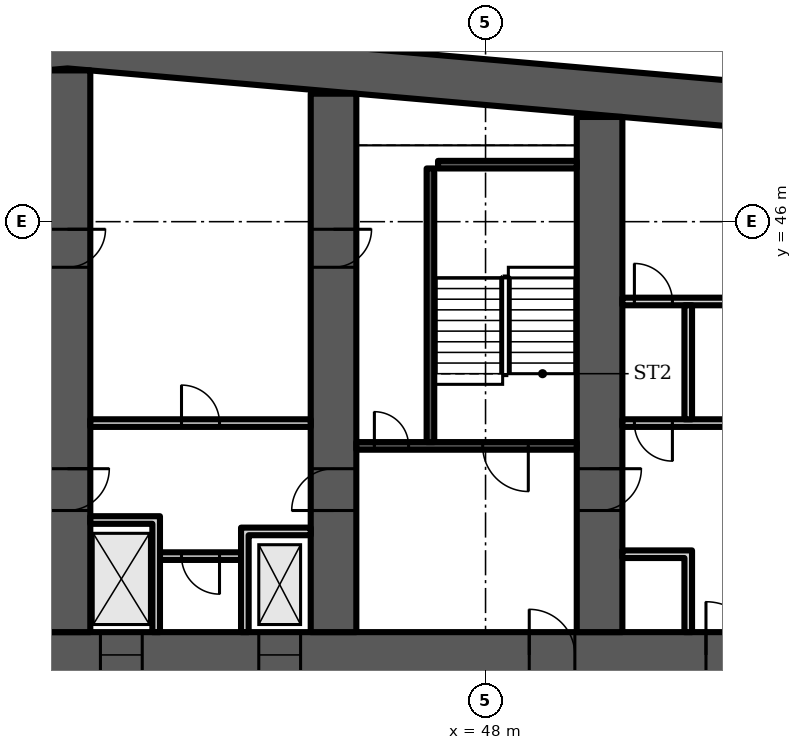
"""IFC4 building model, lengths in metres.
Left out: names, types, materials, properties, quantities, classifications, styles, units other than length and angle.
Written with IfcOpenShell. Run it as: python <this file> out.ifc"""

import sys

from ifc_helpers import new_model, si_unit, direction, frame, frame_2d, origin, place, context, subcontext, project, spatial, polyline, rectangle, outline, extrude, element, fill, save


model = new_model("IFC4")
c1 = context("Model", 3, precision=1e-05, world=origin(), true_north=direction((0.0, 1.0)))
c2 = subcontext(c1, "Body", "Model", "MODEL_VIEW")
j1 = project(units=[si_unit("LENGTHUNIT", "METRE"), si_unit("PLANEANGLEUNIT", "RADIAN")], contexts=[c1])
p1 = place(None, origin())
s1 = spatial("IfcSite", under=j1, at=p1, CompositionType="ELEMENT")
p2 = place(p1, origin())
s2 = spatial("IfcBuilding", under=s1, at=p2, CompositionType="ELEMENT")
p3 = place(p2, frame((0.0, 0.0, 55.9)))
s3 = spatial("IfcBuildingStorey", under=s2, at=p3, CompositionType="ELEMENT", Elevation=55.9)
p4 = place(p3, origin())
e1 = element("IfcWall", 1, at=p4, inside=s3, PredefinedType="SHEAR", context=c2, shape_type="SweptSolid", body=[
    extrude(outline(polyline([(9.0, 47.583), (37.0, 50.032), (65.0, 47.583), (65.0, 48.787), (37.0, 51.237), (9.0, 48.787), (9.0, 47.583)])), origin(), (0.0, 0.0, 1.0), 3.6),
])
p5 = place(p3, frame((9.0, 34.6, 0.0), z_axis=(0.0, 0.0, 1.0), x_axis=(1.0, 0.0, 0.0)))
e2 = element("IfcWall", 2, at=p5, inside=s3, PredefinedType="SHEAR", context=c2, shape_type="SweptSolid", body=[
    extrude(rectangle(XDim=56.0, YDim=1.2, at=frame_2d((28.0, 0.0))), origin(), (0.0, 0.0, 1.0), 3.6),
])
p6 = place(p5, frame((3.3, 0.0, 0.0)))
e3 = element("IfcOpeningElement", 3, at=p6, cuts=e2, PredefinedType="OPENING", context=c2, shape_type="SweptSolid", body=[
    extrude(rectangle(XDim=1.0, YDim=2.1, at=frame_2d((0.5, 1.05))), frame((0.0, 0.61, 0.0), z_axis=(0.0, -1.0, 0.0), x_axis=(1.0, 0.0, 0.0)), (0.0, 0.0, 1.0), 1.22),
])
p7 = place(p5, frame((7.867, 0.0, 0.0)))
e4 = element("IfcOpeningElement", 4, at=p7, cuts=e2, PredefinedType="OPENING", context=c2, shape_type="SweptSolid", body=[
    extrude(rectangle(XDim=1.1, YDim=2.1, at=frame_2d((0.55, 1.05))), frame((0.0, 0.61, 0.0), z_axis=(0.0, -1.0, 0.0), x_axis=(1.0, 0.0, 0.0)), (0.0, 0.0, 1.0), 1.22),
])
p8 = place(p5, frame((12.033, 0.0, 0.0)))
e5 = element("IfcOpeningElement", 5, at=p8, cuts=e2, PredefinedType="OPENING", context=c2, shape_type="SweptSolid", body=[
    extrude(rectangle(XDim=1.1, YDim=2.1, at=frame_2d((0.55, 1.05))), frame((0.0, 0.61, 0.0), z_axis=(0.0, -1.0, 0.0), x_axis=(1.0, 0.0, 0.0)), (0.0, 0.0, 1.0), 1.22),
])
p9 = place(p5, frame((9.8, 0.0, 0.0)))
e6 = element("IfcOpeningElement", 6, at=p9, cuts=e2, PredefinedType="OPENING", context=c2, shape_type="SweptSolid", body=[
    extrude(rectangle(XDim=1.4, YDim=2.1, at=frame_2d((0.7, 1.05))), frame((0.0, 0.61, 0.0), z_axis=(0.0, -1.0, 0.0), x_axis=(1.0, 0.0, 0.0)), (0.0, 0.0, 1.0), 1.22),
])
p10 = place(p5, frame((14.65, 0.0, 0.0)))
e7 = element("IfcOpeningElement", 7, at=p10, cuts=e2, PredefinedType="OPENING", context=c2, shape_type="SweptSolid", body=[
    extrude(rectangle(XDim=1.2, YDim=2.1, at=frame_2d((0.6, 1.05))), frame((0.0, 0.61, 0.0), z_axis=(0.0, -1.0, 0.0), x_axis=(1.0, 0.0, 0.0)), (0.0, 0.0, 1.0), 1.22),
])
p11 = place(p5, frame((21.867, 0.0, 0.0)))
e8 = element("IfcOpeningElement", 8, at=p11, cuts=e2, PredefinedType="OPENING", context=c2, shape_type="SweptSolid", body=[
    extrude(rectangle(XDim=1.1, YDim=2.1, at=frame_2d((0.55, 1.05))), frame((0.0, 0.61, 0.0), z_axis=(0.0, -1.0, 0.0), x_axis=(1.0, 0.0, 0.0)), (0.0, 0.0, 1.0), 1.22),
])
p12 = place(p5, frame((26.033, 0.0, 0.0)))
e9 = element("IfcOpeningElement", 9, at=p12, cuts=e2, PredefinedType="OPENING", context=c2, shape_type="SweptSolid", body=[
    extrude(rectangle(XDim=1.1, YDim=2.1, at=frame_2d((0.55, 1.05))), frame((0.0, 0.61, 0.0), z_axis=(0.0, -1.0, 0.0), x_axis=(1.0, 0.0, 0.0)), (0.0, 0.0, 1.0), 1.22),
])
p13 = place(p5, frame((23.8, 0.0, 0.0)))
e10 = element("IfcOpeningElement", 10, at=p13, cuts=e2, PredefinedType="OPENING", context=c2, shape_type="SweptSolid", body=[
    extrude(rectangle(XDim=1.4, YDim=2.1, at=frame_2d((0.7, 1.05))), frame((0.0, 0.61, 0.0), z_axis=(0.0, -1.0, 0.0), x_axis=(1.0, 0.0, 0.0)), (0.0, 0.0, 1.0), 1.22),
])
p14 = place(p5, frame((28.867, 0.0, 0.0)))
e11 = element("IfcOpeningElement", 11, at=p14, cuts=e2, PredefinedType="OPENING", context=c2, shape_type="SweptSolid", body=[
    extrude(rectangle(XDim=1.1, YDim=2.1, at=frame_2d((0.55, 1.05))), frame((0.0, 0.61, 0.0), z_axis=(0.0, -1.0, 0.0), x_axis=(1.0, 0.0, 0.0)), (0.0, 0.0, 1.0), 1.22),
])
p15 = place(p5, frame((33.033, 0.0, 0.0)))
e12 = element("IfcOpeningElement", 12, at=p15, cuts=e2, PredefinedType="OPENING", context=c2, shape_type="SweptSolid", body=[
    extrude(rectangle(XDim=1.1, YDim=2.1, at=frame_2d((0.55, 1.05))), frame((0.0, 0.61, 0.0), z_axis=(0.0, -1.0, 0.0), x_axis=(1.0, 0.0, 0.0)), (0.0, 0.0, 1.0), 1.22),
])
p16 = place(p5, frame((40.15, 0.0, 0.0)))
e13 = element("IfcOpeningElement", 13, at=p16, cuts=e2, PredefinedType="OPENING", context=c2, shape_type="SweptSolid", body=[
    extrude(rectangle(XDim=1.2, YDim=2.1, at=frame_2d((0.6, 1.05))), frame((0.0, 0.61, 0.0), z_axis=(0.0, -1.0, 0.0), x_axis=(1.0, 0.0, 0.0)), (0.0, 0.0, 1.0), 1.22),
])
p17 = place(p5, frame((44.8, 0.0, 0.0)))
e14 = element("IfcOpeningElement", 14, at=p17, cuts=e2, PredefinedType="OPENING", context=c2, shape_type="SweptSolid", body=[
    extrude(rectangle(XDim=1.4, YDim=2.1, at=frame_2d((0.7, 1.05))), frame((0.0, 0.61, 0.0), z_axis=(0.0, -1.0, 0.0), x_axis=(1.0, 0.0, 0.0)), (0.0, 0.0, 1.0), 1.22),
])
p18 = place(p5, frame((49.867, 0.0, 0.0)))
e15 = element("IfcOpeningElement", 15, at=p18, cuts=e2, PredefinedType="OPENING", context=c2, shape_type="SweptSolid", body=[
    extrude(rectangle(XDim=1.1, YDim=2.1, at=frame_2d((0.55, 1.05))), frame((0.0, 0.61, 0.0), z_axis=(0.0, -1.0, 0.0), x_axis=(1.0, 0.0, 0.0)), (0.0, 0.0, 1.0), 1.22),
])
p19 = place(p5, frame((53.5, 0.0, 0.0)))
e16 = element("IfcOpeningElement", 16, at=p19, cuts=e2, PredefinedType="OPENING", context=c2, shape_type="SweptSolid", body=[
    extrude(rectangle(XDim=1.1, YDim=2.1, at=frame_2d((0.55, 1.05))), frame((0.0, 0.61, 0.0), z_axis=(0.0, -1.0, 0.0), x_axis=(1.0, 0.0, 0.0)), (0.0, 0.0, 1.0), 1.22),
])
p20 = place(p5, frame((51.567, 0.0, 0.0)))
e17 = element("IfcOpeningElement", 17, at=p20, cuts=e2, PredefinedType="OPENING", context=c2, shape_type="SweptSolid", body=[
    extrude(rectangle(XDim=1.4, YDim=2.1, at=frame_2d((0.7, 1.05))), frame((0.0, 0.61, 0.0), z_axis=(0.0, -1.0, 0.0), x_axis=(1.0, 0.0, 0.0)), (0.0, 0.0, 1.0), 1.22),
])
p21 = place(p3, frame((37.0, 35.2, 0.0), z_axis=(0.0, 0.0, 1.0), x_axis=(0.0, 1.0, 0.0)))
e18 = element("IfcWall", 18, at=p21, inside=s3, PredefinedType="SHEAR", context=c2, shape_type="SweptSolid", body=[
    extrude(rectangle(XDim=14.78, YDim=1.2, at=frame_2d((7.39, 0.0))), origin(), (0.0, 0.0, 1.0), 3.6),
])
p22 = place(p21, frame((3.2, 0.0, 0.0)))
e19 = element("IfcOpeningElement", 19, at=p22, cuts=e18, PredefinedType="OPENING", context=c2, shape_type="SweptSolid", body=[
    extrude(rectangle(XDim=1.1, YDim=2.1, at=frame_2d((0.55, 1.05))), frame((0.0, 0.61, 0.0), z_axis=(0.0, -1.0, 0.0), x_axis=(1.0, 0.0, 0.0)), (0.0, 0.0, 1.0), 1.22),
])
p23 = place(p21, frame((9.6, 0.0, 0.0)))
e20 = element("IfcOpeningElement", 20, at=p23, cuts=e18, PredefinedType="OPENING", context=c2, shape_type="SweptSolid", body=[
    extrude(rectangle(XDim=1.0, YDim=2.1, at=frame_2d((0.5, 1.05))), frame((0.0, 0.61, 0.0), z_axis=(0.0, -1.0, 0.0), x_axis=(1.0, 0.0, 0.0)), (0.0, 0.0, 1.0), 1.22),
])
p24 = place(p3, frame((44.0, 35.2, 0.0), z_axis=(0.0, 0.0, 1.0), x_axis=(0.0, 1.0, 0.0)))
e21 = element("IfcWall", 21, at=p24, inside=s3, PredefinedType="SHEAR", context=c2, shape_type="SweptSolid", body=[
    extrude(rectangle(XDim=14.168, YDim=1.2, at=frame_2d((7.084, 0.0))), origin(), (0.0, 0.0, 1.0), 3.6),
])
p25 = place(p24, frame((3.2, 0.0, 0.0)))
e22 = element("IfcOpeningElement", 22, at=p25, cuts=e21, PredefinedType="OPENING", context=c2, shape_type="SweptSolid", body=[
    extrude(rectangle(XDim=1.1, YDim=2.1, at=frame_2d((0.55, 1.05))), frame((0.0, 0.61, 0.0), z_axis=(0.0, -1.0, 0.0), x_axis=(1.0, 0.0, 0.0)), (0.0, 0.0, 1.0), 1.22),
])
p26 = place(p24, frame((9.6, 0.0, 0.0)))
e23 = element("IfcOpeningElement", 23, at=p26, cuts=e21, PredefinedType="OPENING", context=c2, shape_type="SweptSolid", body=[
    extrude(rectangle(XDim=1.0, YDim=2.1, at=frame_2d((0.5, 1.05))), frame((0.0, 0.61, 0.0), z_axis=(0.0, -1.0, 0.0), x_axis=(1.0, 0.0, 0.0)), (0.0, 0.0, 1.0), 1.22),
])
p27 = place(p3, frame((51.0, 35.2, 0.0), z_axis=(0.0, 0.0, 1.0), x_axis=(0.0, 1.0, 0.0)))
e24 = element("IfcWall", 24, at=p27, inside=s3, PredefinedType="SHEAR", context=c2, shape_type="SweptSolid", body=[
    extrude(rectangle(XDim=13.555, YDim=1.2, at=frame_2d((6.778, 0.0))), origin(), (0.0, 0.0, 1.0), 3.6),
])
p28 = place(p27, frame((3.2, 0.0, 0.0)))
e25 = element("IfcOpeningElement", 25, at=p28, cuts=e24, PredefinedType="OPENING", context=c2, shape_type="SweptSolid", body=[
    extrude(rectangle(XDim=1.1, YDim=2.1, at=frame_2d((0.55, 1.05))), frame((0.0, 0.61, 0.0), z_axis=(0.0, -1.0, 0.0), x_axis=(1.0, 0.0, 0.0)), (0.0, 0.0, 1.0), 1.22),
])
p29 = place(p3, frame((39.433, 37.2, 0.0), z_axis=(0.0, 0.0, 1.0), x_axis=(1.0, 0.0, 0.0)))
e26 = element("IfcWall", 26, at=p29, inside=s3, PredefinedType="PARTITIONING", context=c2, shape_type="SweptSolid", body=[
    extrude(rectangle(XDim=2.133, YDim=0.2, at=frame_2d((1.067, 0.0))), origin(), (0.0, 0.0, 1.0), 3.2),
])
p30 = place(p29, frame((0.567, 0.0, 0.0)))
e27 = element("IfcOpeningElement", 27, at=p30, cuts=e26, PredefinedType="OPENING", context=c2, shape_type="SweptSolid", body=[
    extrude(rectangle(XDim=1.0, YDim=2.1, at=frame_2d((0.5, 1.05))), frame((0.0, 0.11, 0.0), z_axis=(0.0, -1.0, 0.0), x_axis=(1.0, 0.0, 0.0)), (0.0, 0.0, 1.0), 0.22),
])
p31 = place(p3, frame((37.6, 40.7, 0.0), z_axis=(0.0, 0.0, 1.0), x_axis=(1.0, 0.0, 0.0)))
e28 = element("IfcWall", 28, at=p31, inside=s3, PredefinedType="PARTITIONING", context=c2, shape_type="SweptSolid", body=[
    extrude(rectangle(XDim=5.8, YDim=0.2, at=frame_2d((2.9, 0.0))), origin(), (0.0, 0.0, 1.0), 3.2),
])
p32 = place(p31, frame((2.4, 0.0, 0.0)))
e29 = element("IfcOpeningElement", 29, at=p32, cuts=e28, PredefinedType="OPENING", context=c2, shape_type="SweptSolid", body=[
    extrude(rectangle(XDim=1.0, YDim=2.1, at=frame_2d((0.5, 1.05))), frame((0.0, 0.11, 0.0), z_axis=(0.0, -1.0, 0.0), x_axis=(1.0, 0.0, 0.0)), (0.0, 0.0, 1.0), 0.22),
])
p33 = place(p3, origin())
e30 = element("IfcWall", 30, at=p33, inside=s3, PredefinedType="PARTITIONING", context=c2, shape_type="SweptSolid", body=[
    extrude(outline(polyline([(41.567, 37.95), (41.767, 37.95), (43.4, 37.95), (43.4, 37.75), (41.767, 37.75), (41.767, 35.2), (41.567, 35.2), (41.567, 37.95)])), origin(), (0.0, 0.0, 1.0), 3.2),
])
p34 = place(p3, origin())
e31 = element("IfcWall", 31, at=p34, inside=s3, PredefinedType="PARTITIONING", context=c2, shape_type="SweptSolid", body=[
    extrude(outline(polyline([(39.233, 38.05), (37.6, 38.05), (37.6, 38.25), (39.233, 38.25), (39.433, 38.25), (39.433, 35.2), (39.233, 35.2), (39.233, 38.05)])), origin(), (0.0, 0.0, 1.0), 3.2),
])
p35 = place(p3, frame((44.6, 40.1, 0.0), z_axis=(0.0, 0.0, 1.0), x_axis=(1.0, 0.0, 0.0)))
e32 = element("IfcWall", 32, at=p35, inside=s3, PredefinedType="SHEAR", context=c2, shape_type="SweptSolid", body=[
    extrude(rectangle(XDim=5.8, YDim=0.2, at=frame_2d((2.9, 0.0))), origin(), (0.0, 0.0, 1.0), 3.2),
])
p36 = place(p35, frame((3.325, 0.0, 0.0)))
e33 = element("IfcOpeningElement", 33, at=p36, cuts=e32, PredefinedType="OPENING", context=c2, shape_type="SweptSolid", body=[
    extrude(rectangle(XDim=1.2, YDim=2.1, at=frame_2d((0.6, 1.05))), frame((0.0, 0.11, 0.0), z_axis=(0.0, -1.0, 0.0), x_axis=(1.0, 0.0, 0.0)), (0.0, 0.0, 1.0), 0.22),
])
p37 = place(p35, frame((0.475, 0.0, 0.0)))
e34 = element("IfcOpeningElement", 34, at=p37, cuts=e32, PredefinedType="OPENING", context=c2, shape_type="SweptSolid", body=[
    extrude(rectangle(XDim=0.9, YDim=2.1, at=frame_2d((0.45, 1.05))), frame((0.0, 0.11, 0.0), z_axis=(0.0, -1.0, 0.0), x_axis=(1.0, 0.0, 0.0)), (0.0, 0.0, 1.0), 0.22),
])
p38 = place(p3, frame((46.55, 40.2, 0.0), z_axis=(0.0, 0.0, 1.0), x_axis=(0.0, 1.0, 0.0)))
e35 = element("IfcWall", 35, at=p38, inside=s3, PredefinedType="SHEAR", context=c2, shape_type="SweptSolid", body=[
    extrude(rectangle(XDim=7.2, YDim=0.2, at=frame_2d((3.6, 0.0))), origin(), (0.0, 0.0, 1.0), 3.2),
])
p39 = place(p3, frame((46.75, 47.5, 0.0), z_axis=(0.0, 0.0, 1.0), x_axis=(1.0, 0.0, 0.0)))
e36 = element("IfcWall", 36, at=p39, inside=s3, PredefinedType="SHEAR", context=c2, shape_type="SweptSolid", body=[
    extrude(rectangle(XDim=3.65, YDim=0.2, at=frame_2d((1.825, 0.0))), origin(), (0.0, 0.0, 1.0), 3.2),
])
p40 = place(p3, frame((51.6, 40.7, 0.0), z_axis=(0.0, 0.0, 1.0), x_axis=(1.0, 0.0, 0.0)))
e37 = element("IfcWall", 37, at=p40, inside=s3, PredefinedType="PARTITIONING", context=c2, shape_type="SweptSolid", body=[
    extrude(rectangle(XDim=5.8, YDim=0.2, at=frame_2d((2.9, 0.0))), origin(), (0.0, 0.0, 1.0), 3.2),
])
p41 = place(p40, frame((0.317, 0.0, 0.0)))
e38 = element("IfcOpeningElement", 38, at=p41, cuts=e37, PredefinedType="OPENING", context=c2, shape_type="SweptSolid", body=[
    extrude(rectangle(XDim=1.0, YDim=2.1, at=frame_2d((0.5, 1.05))), frame((0.0, 0.11, 0.0), z_axis=(0.0, -1.0, 0.0), x_axis=(1.0, 0.0, 0.0)), (0.0, 0.0, 1.0), 0.22),
])
p42 = place(p3, frame((51.6, 43.9, 0.0), z_axis=(0.0, 0.0, 1.0), x_axis=(1.0, 0.0, 0.0)))
e39 = element("IfcWall", 39, at=p42, inside=s3, PredefinedType="PARTITIONING", context=c2, shape_type="SweptSolid", body=[
    extrude(rectangle(XDim=5.8, YDim=0.2, at=frame_2d((2.9, 0.0))), origin(), (0.0, 0.0, 1.0), 3.2),
])
p43 = place(p42, frame((0.317, 0.0, 0.0)))
e40 = element("IfcOpeningElement", 40, at=p43, cuts=e39, PredefinedType="OPENING", context=c2, shape_type="SweptSolid", body=[
    extrude(rectangle(XDim=1.0, YDim=2.1, at=frame_2d((0.5, 1.05))), frame((0.0, 0.11, 0.0), z_axis=(0.0, -1.0, 0.0), x_axis=(1.0, 0.0, 0.0)), (0.0, 0.0, 1.0), 0.22),
])
p44 = place(p3, origin())
e41 = element("IfcWall", 41, at=p44, inside=s3, PredefinedType="PARTITIONING", context=c2, shape_type="SweptSolid", body=[
    extrude(outline(polyline([(53.233, 37.15), (51.6, 37.15), (51.6, 37.35), (53.233, 37.35), (53.433, 37.35), (53.433, 35.2), (53.233, 35.2), (53.233, 37.15)])), origin(), (0.0, 0.0, 1.0), 3.2),
])
p45 = place(p3, origin())
e42 = element("IfcWall", 42, at=p45, inside=s3, PredefinedType="PARTITIONING", context=c2, shape_type="SweptSolid", body=[
    extrude(outline(polyline([(53.233, 40.8), (53.233, 43.8), (53.433, 43.8), (53.433, 40.8), (53.233, 40.8)])), origin(), (0.0, 0.0, 1.0), 3.2),
])
p46 = place(p30, origin())
e43 = element("IfcDoor", 43, at=p46, inside=s3, OperationType="SINGLE_SWING_RIGHT", PredefinedType="DOOR", context=c2, shape_type="SweptSolid", body=[
    extrude(rectangle(XDim=1.0, YDim=2.1, at=frame_2d((0.5, 1.05))), frame((0.0, 0.025, 0.0), z_axis=(0.0, -1.0, 0.0), x_axis=(1.0, 0.0, 0.0)), (0.0, 0.0, 1.0), 0.05),
])
fill(e27, e43)
p47 = place(p14, origin())
e44 = element("IfcDoor", 44, at=p47, inside=s3, OperationType="DOUBLE_DOOR_SLIDING", PredefinedType="DOOR", context=c2, shape_type="SweptSolid", body=[
    extrude(rectangle(XDim=1.1, YDim=2.1, at=frame_2d((0.55, 1.05))), frame((0.0, 0.025, 0.0), z_axis=(0.0, -1.0, 0.0), x_axis=(1.0, 0.0, 0.0)), (0.0, 0.0, 1.0), 0.05),
])
fill(e11, e44)
p48 = place(p15, origin())
e45 = element("IfcDoor", 45, at=p48, inside=s3, OperationType="DOUBLE_DOOR_SLIDING", PredefinedType="DOOR", context=c2, shape_type="SweptSolid", body=[
    extrude(rectangle(XDim=1.1, YDim=2.1, at=frame_2d((0.55, 1.05))), frame((0.0, 0.025, 0.0), z_axis=(0.0, -1.0, 0.0), x_axis=(1.0, 0.0, 0.0)), (0.0, 0.0, 1.0), 0.05),
])
fill(e12, e45)
p49 = place(p32, origin())
e46 = element("IfcDoor", 46, at=p49, inside=s3, OperationType="SINGLE_SWING_LEFT", PredefinedType="DOOR", context=c2, shape_type="SweptSolid", body=[
    extrude(rectangle(XDim=1.0, YDim=2.1, at=frame_2d((0.5, 1.05))), frame((0.0, 0.025, 0.0), z_axis=(0.0, -1.0, 0.0), x_axis=(1.0, 0.0, 0.0)), (0.0, 0.0, 1.0), 0.05),
])
fill(e29, e46)
p50 = place(p36, origin())
e47 = element("IfcDoor", 47, at=p50, inside=s3, OperationType="SINGLE_SWING_RIGHT", PredefinedType="DOOR", context=c2, shape_type="SweptSolid", body=[
    extrude(rectangle(XDim=1.2, YDim=2.1, at=frame_2d((0.6, 1.05))), frame((0.0, 0.025, 0.0), z_axis=(0.0, -1.0, 0.0), x_axis=(1.0, 0.0, 0.0)), (0.0, 0.0, 1.0), 0.05),
])
fill(e33, e47)
p51 = place(p37, origin())
e48 = element("IfcDoor", 48, at=p51, inside=s3, OperationType="SINGLE_SWING_LEFT", PredefinedType="DOOR", context=c2, shape_type="SweptSolid", body=[
    extrude(rectangle(XDim=0.9, YDim=2.1, at=frame_2d((0.45, 1.05))), frame((0.0, 0.025, 0.0), z_axis=(0.0, -1.0, 0.0), x_axis=(1.0, 0.0, 0.0)), (0.0, 0.0, 1.0), 0.05),
])
fill(e34, e48)
p52 = place(p16, origin())
e49 = element("IfcDoor", 49, at=p52, inside=s3, OperationType="SINGLE_SWING_LEFT", PredefinedType="DOOR", context=c2, shape_type="SweptSolid", body=[
    extrude(rectangle(XDim=1.2, YDim=2.1, at=frame_2d((0.6, 1.05))), frame((0.0, 0.025, 0.0), z_axis=(0.0, -1.0, 0.0), x_axis=(1.0, 0.0, 0.0)), (0.0, 0.0, 1.0), 0.05),
])
fill(e13, e49)
p53 = place(p17, origin())
e50 = element("IfcDoor", 50, at=p53, inside=s3, OperationType="DOUBLE_DOOR_SINGLE_SWING", PredefinedType="DOOR", context=c2, shape_type="SweptSolid", body=[
    extrude(rectangle(XDim=1.4, YDim=2.1, at=frame_2d((0.7, 1.05))), frame((0.0, 0.025, 0.0), z_axis=(0.0, -1.0, 0.0), x_axis=(1.0, 0.0, 0.0)), (0.0, 0.0, 1.0), 0.05),
])
fill(e14, e50)
p54 = place(p41, origin())
e51 = element("IfcDoor", 51, at=p54, inside=s3, OperationType="SINGLE_SWING_RIGHT", PredefinedType="DOOR", context=c2, shape_type="SweptSolid", body=[
    extrude(rectangle(XDim=1.0, YDim=2.1, at=frame_2d((0.5, 1.05))), frame((0.0, 0.025, 0.0), z_axis=(0.0, -1.0, 0.0), x_axis=(1.0, 0.0, 0.0)), (0.0, 0.0, 1.0), 0.05),
])
fill(e38, e51)
p55 = place(p43, origin())
e52 = element("IfcDoor", 52, at=p55, inside=s3, OperationType="SINGLE_SWING_LEFT", PredefinedType="DOOR", context=c2, shape_type="SweptSolid", body=[
    extrude(rectangle(XDim=1.0, YDim=2.1, at=frame_2d((0.5, 1.05))), frame((0.0, 0.025, 0.0), z_axis=(0.0, -1.0, 0.0), x_axis=(1.0, 0.0, 0.0)), (0.0, 0.0, 1.0), 0.05),
])
fill(e40, e52)
p56 = place(p22, origin())
e53 = element("IfcDoor", 53, at=p56, inside=s3, OperationType="SINGLE_SWING_RIGHT", PredefinedType="DOOR", context=c2, shape_type="SweptSolid", body=[
    extrude(rectangle(XDim=1.1, YDim=2.1, at=frame_2d((0.55, 1.05))), frame((0.0, 0.025, 0.0), z_axis=(0.0, -1.0, 0.0), x_axis=(1.0, 0.0, 0.0)), (0.0, 0.0, 1.0), 0.05),
])
fill(e19, e53)
p57 = place(p23, origin())
e54 = element("IfcDoor", 54, at=p57, inside=s3, OperationType="SINGLE_SWING_RIGHT", PredefinedType="DOOR", context=c2, shape_type="SweptSolid", body=[
    extrude(rectangle(XDim=1.0, YDim=2.1, at=frame_2d((0.5, 1.05))), frame((0.0, 0.6, 0.0), z_axis=(0.0, -1.0, 0.0), x_axis=(1.0, 0.0, 0.0)), (0.0, 0.0, 1.0), 1.199),
])
fill(e20, e54)
p58 = place(p25, origin())
e55 = element("IfcDoor", 55, at=p58, inside=s3, OperationType="SINGLE_SWING_LEFT", PredefinedType="DOOR", context=c2, shape_type="SweptSolid", body=[
    extrude(rectangle(XDim=1.1, YDim=2.1, at=frame_2d((0.55, 1.05))), frame((0.0, 0.025, 0.0), z_axis=(0.0, -1.0, 0.0), x_axis=(1.0, 0.0, 0.0)), (0.0, 0.0, 1.0), 0.05),
])
fill(e22, e55)
p59 = place(p26, origin())
e56 = element("IfcDoor", 56, at=p59, inside=s3, OperationType="SINGLE_SWING_RIGHT", PredefinedType="DOOR", context=c2, shape_type="SweptSolid", body=[
    extrude(rectangle(XDim=1.0, YDim=2.1, at=frame_2d((0.5, 1.05))), frame((0.0, 0.6, 0.0), z_axis=(0.0, -1.0, 0.0), x_axis=(1.0, 0.0, 0.0)), (0.0, 0.0, 1.0), 1.199),
])
fill(e23, e56)
p60 = place(p28, origin())
e57 = element("IfcDoor", 57, at=p60, inside=s3, OperationType="SINGLE_SWING_RIGHT", PredefinedType="DOOR", context=c2, shape_type="SweptSolid", body=[
    extrude(rectangle(XDim=1.1, YDim=2.1, at=frame_2d((0.55, 1.05))), frame((0.0, 0.025, 0.0), z_axis=(0.0, -1.0, 0.0), x_axis=(1.0, 0.0, 0.0)), (0.0, 0.0, 1.0), 0.05),
])
fill(e25, e57)
save(model, sys.argv[1])
